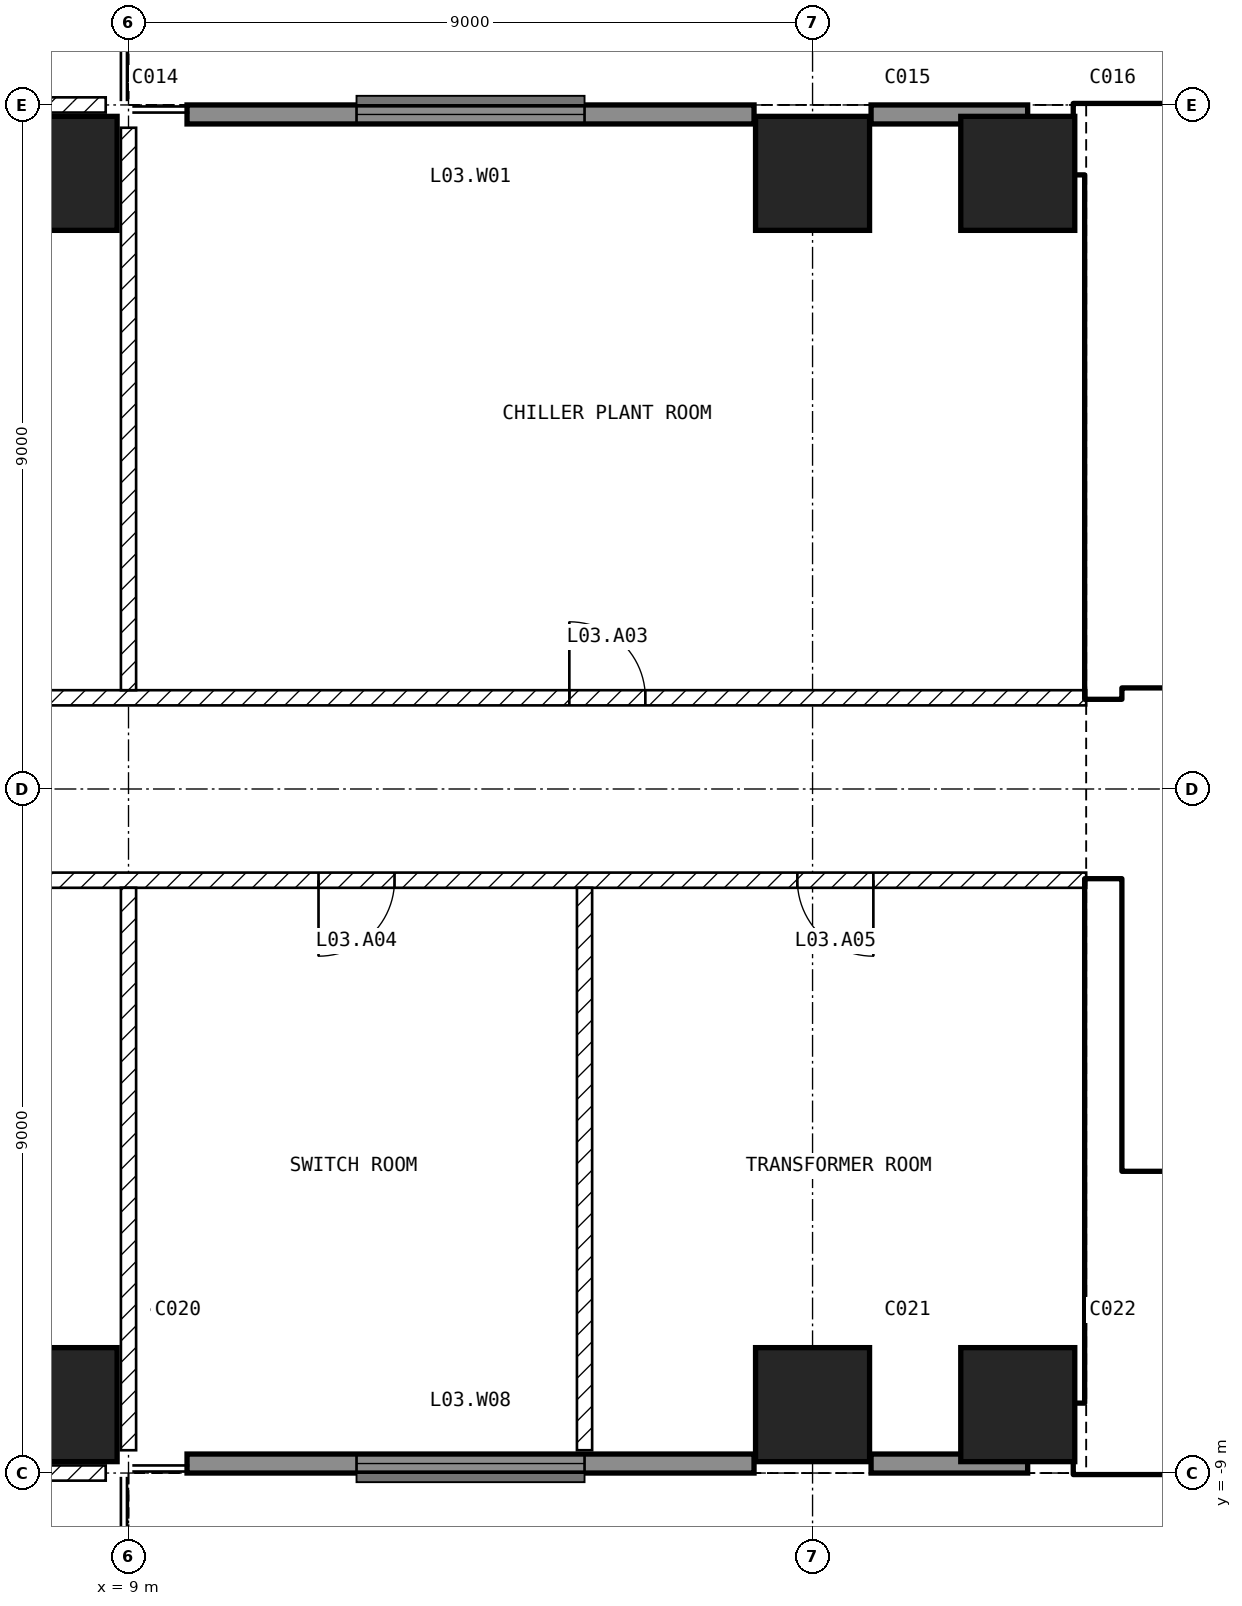
"""IFC4 building model, lengths in metres.
Left out: names, types, materials, properties, quantities, classifications, styles, units other than length and angle.
Written with IfcOpenShell. Run it as: python <this file> out.ifc"""

import sys

from ifc_helpers import new_model, si_unit, direction, frame, frame_2d, origin, origin_2d, place, context, subcontext, project, spatial, rectangle, extrude, element, fill, save


model = new_model("IFC4")
c1 = context("Model", 3, precision=1e-05, world=origin(), true_north=direction((0.0, 1.0)))
c2 = subcontext(c1, "Body", "Model", "MODEL_VIEW")
j1 = project(units=[si_unit("LENGTHUNIT", "METRE"), si_unit("PLANEANGLEUNIT", "RADIAN")], contexts=[c1])
p1 = place(None, origin())
s1 = spatial("IfcSite", under=j1, at=p1, CompositionType="ELEMENT")
p2 = place(p1, origin())
s2 = spatial("IfcBuilding", under=s1, at=p2, CompositionType="ELEMENT")
p3 = place(p2, frame((0.0, 0.0, 27.0)))
s3 = spatial("IfcBuildingStorey", under=s2, at=p3, CompositionType="ELEMENT", Elevation=27.0)
for number, where, z_axis, x_axis in (
    (1, (8.1, -8.1, -0.45), (0.0, 0.0, 1.0), (1.0, 0.0, 0.0)),
    (2, (8.1, 8.1, -0.45), (0.0, 0.0, 1.0), (1.0, 0.0, 0.0)),
    (3, (18.0, -8.1, -0.45), (0.0, 0.0, 1.0), (1.0, 0.0, 0.0)),
    (4, (18.0, 8.1, -0.45), (0.0, 0.0, 1.0), (1.0, 0.0, 0.0)),
    (5, (20.7, -8.1, -0.45), (0.0, 0.0, 1.0), (1.0, 0.0, 0.0)),
    (6, (20.7, 8.1, -0.45), (0.0, 0.0, 1.0), (1.0, 0.0, 0.0)),
):
    element("IfcColumn", number, at=place(p3, frame(where, z_axis=z_axis, x_axis=x_axis)), inside=s3, PredefinedType="COLUMN", context=c2, shape_type="SweptSolid", body=[
        extrude(rectangle(XDim=1.5, YDim=1.5, at=origin_2d()), origin(), (0.0, 0.0, 1.0), 5.15),
    ])
p4 = place(p3, frame((20.83, 8.875, 0.0), z_axis=(0.0, 0.0, 1.0), x_axis=(-1.0, 0.0, 0.0)))
e7 = element("IfcWall", 7, at=p4, inside=s3, PredefinedType="SOLIDWALL", context=c2, shape_type="SweptSolid", body=[
    extrude(rectangle(XDim=2.06, YDim=0.25, at=frame_2d((1.03, 0.0))), origin(), (0.0, 0.0, 1.0), 4.7),
])
p5 = place(p3, frame((17.23, 8.875, 0.0), z_axis=(0.0, 0.0, 1.0), x_axis=(-1.0, 0.0, 0.0)))
e8 = element("IfcWall", 8, at=p5, inside=s3, PredefinedType="SOLIDWALL", context=c2, shape_type="SweptSolid", body=[
    extrude(rectangle(XDim=7.46, YDim=0.25, at=frame_2d((3.73, 0.0))), origin(), (0.0, 0.0, 1.0), 4.7),
])
p6 = place(p5, frame((2.23, 0.0, 1.0)))
e9 = element("IfcOpeningElement", 9, at=p6, cuts=e8, PredefinedType="OPENING", context=c2, shape_type="SweptSolid", body=[
    extrude(rectangle(XDim=3.0, YDim=2.4, at=frame_2d((1.5, 1.2))), frame((0.0, 0.135, 0.0), z_axis=(0.0, -1.0, 0.0), x_axis=(1.0, 0.0, 0.0)), (0.0, 0.0, 1.0), 0.27),
])
p7 = place(p3, frame((9.77, -8.875, 0.0), z_axis=(0.0, 0.0, 1.0), x_axis=(1.0, 0.0, 0.0)))
e10 = element("IfcWall", 10, at=p7, inside=s3, PredefinedType="SOLIDWALL", context=c2, shape_type="SweptSolid", body=[
    extrude(rectangle(XDim=7.46, YDim=0.25, at=frame_2d((3.73, 0.0))), origin(), (0.0, 0.0, 1.0), 4.7),
])
p8 = place(p7, frame((2.23, 0.0, 1.0)))
e11 = element("IfcOpeningElement", 11, at=p8, cuts=e10, PredefinedType="OPENING", context=c2, shape_type="SweptSolid", body=[
    extrude(rectangle(XDim=3.0, YDim=2.4, at=frame_2d((1.5, 1.2))), frame((0.0, 0.135, 0.0), z_axis=(0.0, -1.0, 0.0), x_axis=(1.0, 0.0, 0.0)), (0.0, 0.0, 1.0), 0.27),
])
p9 = place(p3, frame((18.77, -8.875, 0.0), z_axis=(0.0, 0.0, 1.0), x_axis=(1.0, 0.0, 0.0)))
e12 = element("IfcWall", 12, at=p9, inside=s3, PredefinedType="SOLIDWALL", context=c2, shape_type="SweptSolid", body=[
    extrude(rectangle(XDim=2.06, YDim=0.25, at=frame_2d((1.03, 0.0))), origin(), (0.0, 0.0, 1.0), 4.7),
])
p10 = place(p3, frame((21.45, -8.55, 0.0), z_axis=(0.0, 0.0, 1.0), x_axis=(1.0, 0.0, 0.0)))
e13 = element("IfcWall", 13, at=p10, inside=s3, PredefinedType="SHEAR", context=c2, shape_type="SweptSolid", body=[
    extrude(rectangle(XDim=10.95, YDim=0.9, at=frame_2d((5.475, 0.0))), origin(), (0.0, 0.0, 1.0), 4.7),
])
p11 = place(p3, frame((21.45, 8.55, 0.0), z_axis=(0.0, 0.0, 1.0), x_axis=(1.0, 0.0, 0.0)))
e14 = element("IfcWall", 14, at=p11, inside=s3, PredefinedType="SHEAR", context=c2, shape_type="SweptSolid", body=[
    extrude(rectangle(XDim=10.05, YDim=0.9, at=frame_2d((5.025, 0.0))), origin(), (0.0, 0.0, 1.0), 4.7),
])
for number, where, z_axis, x_axis in (
    (15, (21.825, -8.1, 0.0), (0.0, 0.0, 1.0), (0.0, 1.0, 0.0)),
    (16, (21.825, 1.2, 0.0), (0.0, 0.0, 1.0), (0.0, 1.0, 0.0)),
):
    element("IfcWall", number, at=place(p3, frame(where, z_axis=z_axis, x_axis=x_axis)), inside=s3, PredefinedType="SHEAR", context=c2, shape_type="SweptSolid", body=[
        extrude(rectangle(XDim=6.9, YDim=0.45, at=frame_2d((3.45, 0.0))), origin(), (0.0, 0.0, 1.0), 4.7),
    ])
p12 = place(p3, frame((22.05, 1.45, 0.0), z_axis=(0.0, 0.0, 1.0), x_axis=(1.0, 0.0, 0.0)))
e17 = element("IfcWall", 17, at=p12, inside=s3, PredefinedType="SOLIDWALL", context=c2, shape_type="SweptSolid", body=[
    extrude(rectangle(XDim=13.05, YDim=0.2, at=frame_2d((6.525, 0.0))), origin(), (0.0, 0.0, 1.0), 4.7),
])
p13 = place(p12, frame((0.75, 0.0, 0.0)))
e18 = element("IfcOpeningElement", 18, at=p13, cuts=e17, PredefinedType="OPENING", context=c2, shape_type="SweptSolid", body=[
    extrude(rectangle(XDim=1.0, YDim=2.1, at=frame_2d((0.5, 1.05))), frame((0.0, 0.11, 0.0), z_axis=(0.0, -1.0, 0.0), x_axis=(1.0, 0.0, 0.0)), (0.0, 0.0, 1.0), 0.22),
])
p14 = place(p12, frame((3.25, 0.0, 0.0)))
e19 = element("IfcOpeningElement", 19, at=p14, cuts=e17, PredefinedType="OPENING", context=c2, shape_type="SweptSolid", body=[
    extrude(rectangle(XDim=1.0, YDim=2.1, at=frame_2d((0.5, 1.05))), frame((0.0, 0.11, 0.0), z_axis=(0.0, -1.0, 0.0), x_axis=(1.0, 0.0, 0.0)), (0.0, 0.0, 1.0), 0.22),
])
p15 = place(p3, frame((22.05, 5.15, 0.0), z_axis=(0.0, 0.0, 1.0), x_axis=(1.0, 0.0, 0.0)))
e20 = element("IfcWall", 20, at=p15, inside=s3, PredefinedType="SOLIDWALL", context=c2, shape_type="SweptSolid", body=[
    extrude(rectangle(XDim=6.3, YDim=0.2, at=frame_2d((3.15, 0.0))), origin(), (0.0, 0.0, 1.0), 4.7),
])
p16 = place(p15, frame((0.2, 0.0, 0.0)))
e21 = element("IfcOpeningElement", 21, at=p16, cuts=e20, PredefinedType="OPENING", context=c2, shape_type="SweptSolid", body=[
    extrude(rectangle(XDim=1.0, YDim=2.1, at=frame_2d((0.5, 1.05))), frame((0.0, 0.11, 0.0), z_axis=(0.0, -1.0, 0.0), x_axis=(1.0, 0.0, 0.0)), (0.0, 0.0, 1.0), 0.22),
])
p17 = place(p3, frame((22.05, -5.15, 0.0), z_axis=(0.0, 0.0, 1.0), x_axis=(1.0, 0.0, 0.0)))
e22 = element("IfcWall", 22, at=p17, inside=s3, PredefinedType="SOLIDWALL", context=c2, shape_type="SweptSolid", body=[
    extrude(rectangle(XDim=6.3, YDim=0.2, at=frame_2d((3.15, 0.0))), origin(), (0.0, 0.0, 1.0), 4.7),
])
p18 = place(p17, frame((0.2, 0.0, 0.0)))
e23 = element("IfcOpeningElement", 23, at=p18, cuts=e22, PredefinedType="OPENING", context=c2, shape_type="SweptSolid", body=[
    extrude(rectangle(XDim=1.0, YDim=2.1, at=frame_2d((0.5, 1.05))), frame((0.0, 0.11, 0.0), z_axis=(0.0, -1.0, 0.0), x_axis=(1.0, 0.0, 0.0)), (0.0, 0.0, 1.0), 0.22),
])
p19 = place(p3, frame((-21.6, 1.2, 0.0), z_axis=(0.0, 0.0, 1.0), x_axis=(1.0, 0.0, 0.0)))
e24 = element("IfcWall", 24, at=p19, inside=s3, PredefinedType="PARTITIONING", context=c2, shape_type="SweptSolid", body=[
    extrude(rectangle(XDim=43.2, YDim=0.2, at=frame_2d((21.6, 0.0))), origin(), (0.0, 0.0, 1.0), 4.7),
])
p20 = place(p19, frame((21.1, 0.0, 0.0)))
e25 = element("IfcOpeningElement", 25, at=p20, cuts=e24, PredefinedType="OPENING", context=c2, shape_type="SweptSolid", body=[
    extrude(rectangle(XDim=1.0, YDim=2.1, at=frame_2d((0.5, 1.05))), frame((0.0, 0.11, 0.0), z_axis=(0.0, -1.0, 0.0), x_axis=(1.0, 0.0, 0.0)), (0.0, 0.0, 1.0), 0.22),
])
p21 = place(p19, frame((36.4, 0.0, 0.0)))
e26 = element("IfcOpeningElement", 26, at=p21, cuts=e24, PredefinedType="OPENING", context=c2, shape_type="SweptSolid", body=[
    extrude(rectangle(XDim=1.0, YDim=2.1, at=frame_2d((0.5, 1.05))), frame((0.0, 0.11, 0.0), z_axis=(0.0, -1.0, 0.0), x_axis=(1.0, 0.0, 0.0)), (0.0, 0.0, 1.0), 0.22),
])
p22 = place(p19, frame((5.8, 0.0, 0.0)))
e27 = element("IfcOpeningElement", 27, at=p22, cuts=e24, PredefinedType="OPENING", context=c2, shape_type="SweptSolid", body=[
    extrude(rectangle(XDim=1.0, YDim=2.1, at=frame_2d((0.5, 1.05))), frame((0.0, 0.11, 0.0), z_axis=(0.0, -1.0, 0.0), x_axis=(1.0, 0.0, 0.0)), (0.0, 0.0, 1.0), 0.22),
])
p23 = place(p3, frame((21.6, -1.2, 0.0), z_axis=(0.0, 0.0, 1.0), x_axis=(-1.0, 0.0, 0.0)))
e28 = element("IfcWall", 28, at=p23, inside=s3, PredefinedType="PARTITIONING", context=c2, shape_type="SweptSolid", body=[
    extrude(rectangle(XDim=43.2, YDim=0.2, at=frame_2d((21.6, 0.0))), origin(), (0.0, 0.0, 1.0), 4.7),
])
p24 = place(p23, frame((21.1, 0.0, 0.0)))
e29 = element("IfcOpeningElement", 29, at=p24, cuts=e28, PredefinedType="OPENING", context=c2, shape_type="SweptSolid", body=[
    extrude(rectangle(XDim=1.0, YDim=2.1, at=frame_2d((0.5, 1.05))), frame((0.0, 0.11, 0.0), z_axis=(0.0, -1.0, 0.0), x_axis=(1.0, 0.0, 0.0)), (0.0, 0.0, 1.0), 0.22),
])
p25 = place(p23, frame((9.1, 0.0, 0.0)))
e30 = element("IfcOpeningElement", 30, at=p25, cuts=e28, PredefinedType="OPENING", context=c2, shape_type="SweptSolid", body=[
    extrude(rectangle(XDim=1.0, YDim=2.1, at=frame_2d((0.5, 1.05))), frame((0.0, 0.11, 0.0), z_axis=(0.0, -1.0, 0.0), x_axis=(1.0, 0.0, 0.0)), (0.0, 0.0, 1.0), 0.22),
])
p26 = place(p23, frame((2.8, 0.0, 0.0)))
e31 = element("IfcOpeningElement", 31, at=p26, cuts=e28, PredefinedType="OPENING", context=c2, shape_type="SweptSolid", body=[
    extrude(rectangle(XDim=1.0, YDim=2.1, at=frame_2d((0.5, 1.05))), frame((0.0, 0.11, 0.0), z_axis=(0.0, -1.0, 0.0), x_axis=(1.0, 0.0, 0.0)), (0.0, 0.0, 1.0), 0.22),
])
p27 = place(p23, frame((33.7, 0.0, 0.0)))
e32 = element("IfcOpeningElement", 32, at=p27, cuts=e28, PredefinedType="OPENING", context=c2, shape_type="SweptSolid", body=[
    extrude(rectangle(XDim=1.0, YDim=2.1, at=frame_2d((0.5, 1.05))), frame((0.0, 0.11, 0.0), z_axis=(0.0, -1.0, 0.0), x_axis=(1.0, 0.0, 0.0)), (0.0, 0.0, 1.0), 0.22),
])
p28 = place(p23, frame((40.0, 0.0, 0.0)))
e33 = element("IfcOpeningElement", 33, at=p28, cuts=e28, PredefinedType="OPENING", context=c2, shape_type="SweptSolid", body=[
    extrude(rectangle(XDim=1.0, YDim=2.1, at=frame_2d((0.5, 1.05))), frame((0.0, 0.11, 0.0), z_axis=(0.0, -1.0, 0.0), x_axis=(1.0, 0.0, 0.0)), (0.0, 0.0, 1.0), 0.22),
])
p29 = place(p3, frame((9.0, 8.7, 0.0), z_axis=(0.0, 0.0, 1.0), x_axis=(0.0, -1.0, 0.0)))
e34 = element("IfcWall", 34, at=p29, inside=s3, PredefinedType="PARTITIONING", context=c2, shape_type="SweptSolid", body=[
    extrude(rectangle(XDim=7.4, YDim=0.2, at=frame_2d((3.7, 0.0))), origin(), (0.0, 0.0, 1.0), 4.7),
])
p30 = place(p3, frame((-8.7, 9.0, 0.0), z_axis=(0.0, 0.0, 1.0), x_axis=(1.0, 0.0, 0.0)))
e35 = element("IfcWall", 35, at=p30, inside=s3, PredefinedType="PARTITIONING", context=c2, shape_type="SweptSolid", body=[
    extrude(rectangle(XDim=17.4, YDim=0.2, at=frame_2d((8.7, 0.0))), origin(), (0.0, 0.0, 1.0), 4.7),
])
p31 = place(p30, frame((8.2, 0.0, 0.0)))
e36 = element("IfcOpeningElement", 36, at=p31, cuts=e35, PredefinedType="OPENING", context=c2, shape_type="SweptSolid", body=[
    extrude(rectangle(XDim=1.0, YDim=2.1, at=frame_2d((0.5, 1.05))), frame((0.0, 0.11, 0.0), z_axis=(0.0, -1.0, 0.0), x_axis=(1.0, 0.0, 0.0)), (0.0, 0.0, 1.0), 0.22),
])
p32 = place(p3, frame((9.0, -1.3, 0.0), z_axis=(0.0, 0.0, 1.0), x_axis=(0.0, -1.0, 0.0)))
e37 = element("IfcWall", 37, at=p32, inside=s3, PredefinedType="PARTITIONING", context=c2, shape_type="SweptSolid", body=[
    extrude(rectangle(XDim=7.4, YDim=0.2, at=frame_2d((3.7, 0.0))), origin(), (0.0, 0.0, 1.0), 4.7),
])
p33 = place(p3, frame((8.7, -9.0, 0.0), z_axis=(0.0, 0.0, 1.0), x_axis=(-1.0, 0.0, 0.0)))
e38 = element("IfcWall", 38, at=p33, inside=s3, PredefinedType="PARTITIONING", context=c2, shape_type="SweptSolid", body=[
    extrude(rectangle(XDim=17.4, YDim=0.2, at=frame_2d((8.7, 0.0))), origin(), (0.0, 0.0, 1.0), 4.7),
])
p34 = place(p33, frame((8.2, 0.0, 0.0)))
e39 = element("IfcOpeningElement", 39, at=p34, cuts=e38, PredefinedType="OPENING", context=c2, shape_type="SweptSolid", body=[
    extrude(rectangle(XDim=1.0, YDim=2.1, at=frame_2d((0.5, 1.05))), frame((0.0, 0.11, 0.0), z_axis=(0.0, -1.0, 0.0), x_axis=(1.0, 0.0, 0.0)), (0.0, 0.0, 1.0), 0.22),
])
p35 = place(p3, frame((15.0, -1.3, 0.0), z_axis=(0.0, 0.0, 1.0), x_axis=(0.0, -1.0, 0.0)))
e40 = element("IfcWall", 40, at=p35, inside=s3, PredefinedType="PARTITIONING", context=c2, shape_type="SweptSolid", body=[
    extrude(rectangle(XDim=7.4, YDim=0.2, at=frame_2d((3.7, 0.0))), origin(), (0.0, 0.0, 1.0), 4.7),
])
p36 = place(p6, origin())
e41 = element("IfcWindow", 41, at=p36, inside=s3, PartitioningType="SINGLE_PANEL", PredefinedType="WINDOW", context=c2, shape_type="SweptSolid", body=[
    extrude(rectangle(XDim=3.0, YDim=2.4, at=frame_2d((1.5, 1.2))), frame((0.0, 0.03, 0.0), z_axis=(0.0, -1.0, 0.0), x_axis=(1.0, 0.0, 0.0)), (0.0, 0.0, 1.0), 0.06),
])
fill(e9, e41)
p37 = place(p8, origin())
e42 = element("IfcWindow", 42, at=p37, inside=s3, PartitioningType="SINGLE_PANEL", PredefinedType="WINDOW", context=c2, shape_type="SweptSolid", body=[
    extrude(rectangle(XDim=3.0, YDim=2.4, at=frame_2d((1.5, 1.2))), frame((0.0, 0.03, 0.0), z_axis=(0.0, -1.0, 0.0), x_axis=(1.0, 0.0, 0.0)), (0.0, 0.0, 1.0), 0.06),
])
fill(e11, e42)
p38 = place(p18, origin())
e43 = element("IfcDoor", 43, at=p38, inside=s3, OperationType="SINGLE_SWING_LEFT", PredefinedType="DOOR", context=c2, shape_type="SweptSolid", body=[
    extrude(rectangle(XDim=1.0, YDim=2.1, at=frame_2d((0.5, 1.05))), frame((0.0, 0.025, 0.0), z_axis=(0.0, -1.0, 0.0), x_axis=(1.0, 0.0, 0.0)), (0.0, 0.0, 1.0), 0.05),
])
fill(e23, e43)
p39 = place(p16, origin())
e44 = element("IfcDoor", 44, at=p39, inside=s3, OperationType="SINGLE_SWING_LEFT", PredefinedType="DOOR", context=c2, shape_type="SweptSolid", body=[
    extrude(rectangle(XDim=1.0, YDim=2.1, at=frame_2d((0.5, 1.05))), frame((0.0, 0.025, 0.0), z_axis=(0.0, -1.0, 0.0), x_axis=(1.0, 0.0, 0.0)), (0.0, 0.0, 1.0), 0.05),
])
fill(e21, e44)
p40 = place(p21, origin())
e45 = element("IfcDoor", 45, at=p40, inside=s3, OperationType="SINGLE_SWING_LEFT", PredefinedType="DOOR", context=c2, shape_type="SweptSolid", body=[
    extrude(rectangle(XDim=1.0, YDim=2.1, at=frame_2d((0.5, 1.05))), frame((0.0, 0.025, 0.0), z_axis=(0.0, -1.0, 0.0), x_axis=(1.0, 0.0, 0.0)), (0.0, 0.0, 1.0), 0.05),
])
fill(e26, e45)
p41 = place(p25, origin())
e46 = element("IfcDoor", 46, at=p41, inside=s3, OperationType="SINGLE_SWING_RIGHT", PredefinedType="DOOR", context=c2, shape_type="SweptSolid", body=[
    extrude(rectangle(XDim=1.0, YDim=2.1, at=frame_2d((0.5, 1.05))), frame((0.0, 0.025, 0.0), z_axis=(0.0, -1.0, 0.0), x_axis=(1.0, 0.0, 0.0)), (0.0, 0.0, 1.0), 0.05),
])
fill(e30, e46)
p42 = place(p26, origin())
e47 = element("IfcDoor", 47, at=p42, inside=s3, OperationType="SINGLE_SWING_LEFT", PredefinedType="DOOR", context=c2, shape_type="SweptSolid", body=[
    extrude(rectangle(XDim=1.0, YDim=2.1, at=frame_2d((0.5, 1.05))), frame((0.0, 0.025, 0.0), z_axis=(0.0, -1.0, 0.0), x_axis=(1.0, 0.0, 0.0)), (0.0, 0.0, 1.0), 0.05),
])
fill(e31, e47)
save(model, sys.argv[1])
